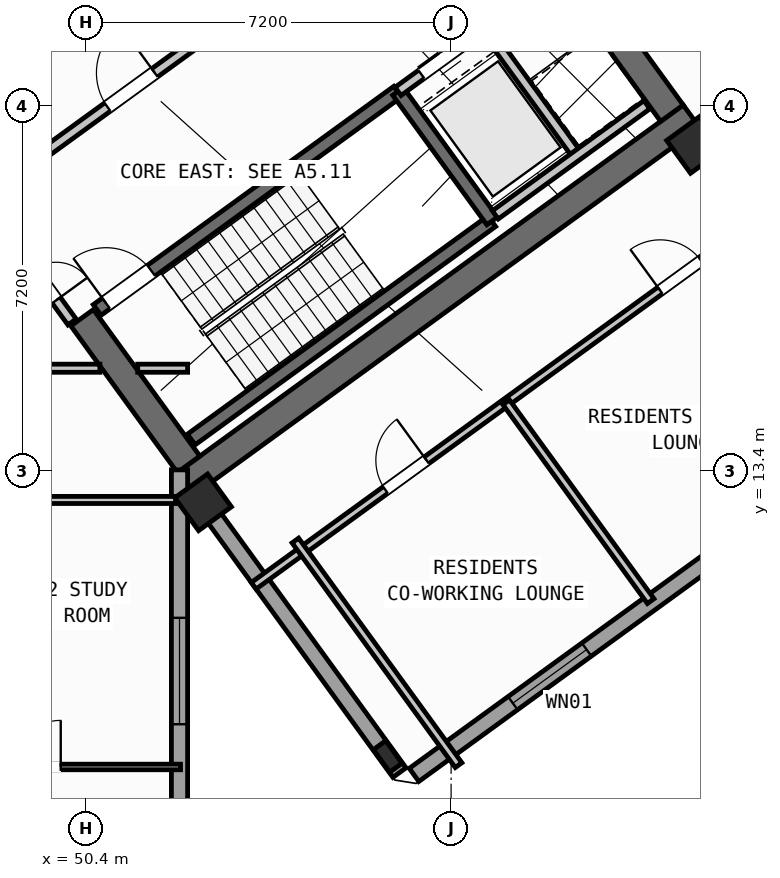
"""IFC4 building model, lengths in metres.
Left out: names, types, materials, properties, quantities, classifications, styles, units other than length and angle.
Written with IfcOpenShell. Run it as: python <this file> out.ifc"""

import sys

from ifc_helpers import new_model, si_unit, direction, frame, frame_2d, origin, origin_2d, place, context, subcontext, project, spatial, rectangle, hollow_rectangle, i_section, extrude, source, transform, mapped, element, fill, save


model = new_model("IFC4")
c1 = context("Model", 3, precision=1e-05, world=origin(), true_north=direction((0.0, 1.0)))
c2 = subcontext(c1, "Body", "Model", "MODEL_VIEW")
j1 = project(units=[si_unit("LENGTHUNIT", "METRE"), si_unit("PLANEANGLEUNIT", "RADIAN")], contexts=[c1])
p1 = place(None, origin())
s1 = spatial("IfcSite", under=j1, at=p1, CompositionType="ELEMENT")
p2 = place(p1, origin())
s2 = spatial("IfcBuilding", under=s1, at=p2, CompositionType="ELEMENT")
p3 = place(p2, frame((0.0, 0.0, 174.9)))
s3 = spatial("IfcBuildingStorey", under=s2, at=p3, CompositionType="ELEMENT", Elevation=174.9)
p4 = place(p3, frame((52.359, 13.14, 0.0), z_axis=(0.0, 0.0, 1.0), x_axis=(0.809014896919, 0.587788139183, 0.0)))
e1 = element("IfcWall", 1, at=p4, inside=s3, PredefinedType="SHEAR", context=c2, shape_type="SweptSolid", body=[
    extrude(rectangle(XDim=12.34, YDim=0.55, at=frame_2d((6.17, 0.0))), origin(), (0.0, 0.0, 1.0), 4.22),
])
for number, where, z_axis, x_axis in (
    (2, (52.42, 13.524, 0.0), (0.0, 0.0, 1.0), (-0.588, 0.809, 0.0)),
    (3, (61.958, 20.454, 0.0), (0.0, 0.0, 1.0), (-0.588, 0.809, 0.0)),
):
    element("IfcWall", number, at=place(p3, frame(where, z_axis=z_axis, x_axis=x_axis)), inside=s3, PredefinedType="SHEAR", context=c2, shape_type="SweptSolid", body=[
        extrude(rectangle(XDim=3.575, YDim=0.55, at=frame_2d((1.788, 0.0))), origin(), (0.0, 0.0, 1.0), 4.22),
    ])
m1 = source(origin(), c2, "Body", "SweptSolid", [
    extrude(i_section(OverallWidth=0.3, OverallDepth=0.55, WebThickness=0.015, FlangeThickness=0.029, at=origin_2d()), origin(), (0.0, 0.0, 1.0), 4.5),
])
p5 = place(p3, frame((56.35, 7.758, 0.0), z_axis=(0.0, 0.0, 1.0), x_axis=(0.809016994375, 0.587785252292, 0.0)))
e4 = element("IfcColumn", 4, at=p5, inside=s3, PredefinedType="COLUMN", context=c2, shape_type="MappedRepresentation", body=[
    mapped(m1, transform((0.0, 0.0, 0.0), scale=1.0)),
])
m2 = source(origin(), c2, "Body", "SweptSolid", [
    extrude(hollow_rectangle(XDim=0.8, YDim=0.8, WallThickness=0.032, at=origin_2d()), origin(), (0.0, 0.0, 1.0), 4.5),
])
for number, where, z_axis, x_axis in (
    (5, (52.705, 12.773, 0.0), (0.0, 0.0, 1.0), (0.809, 0.588, 0.0)),
    (6, (62.414, 19.827, 0.0), (0.0, 0.0, 1.0), (0.809, 0.588, 0.0)),
):
    element("IfcColumn", number, at=place(p3, frame(where, z_axis=z_axis, x_axis=x_axis)), inside=s3, PredefinedType="COLUMN", context=c2, shape_type="MappedRepresentation", body=[
        mapped(m2, transform((0.0, 0.0, 0.0), scale=1.0)),
    ])
p6 = place(p3, frame((58.455, 35.484, 0.0), z_axis=(0.0, 0.0, 1.0), x_axis=(0.587783625747, -0.809018176127, 0.0)))
e7 = element("IfcWall", 7, at=p6, inside=s3, PredefinedType="STANDARD", context=c2, shape_type="SweptSolid", body=[
    extrude(rectangle(XDim=21.587, YDim=0.32, at=frame_2d((10.794, 0.0))), origin(), (0.0, 0.0, 1.0), 2.395),
])
p7 = place(p6, frame((1.807, 0.0, 1.0)))
e8 = element("IfcOpeningElement", 8, at=p7, cuts=e7, PredefinedType="OPENING", context=c2, shape_type="SweptSolid", body=[
    extrude(rectangle(XDim=0.9, YDim=1.25, at=frame_2d((0.45, 0.625))), frame((0.0, 0.17, 0.0), z_axis=(0.0, -1.0, 0.0), x_axis=(1.0, 0.0, 0.0)), (0.0, 0.0, 1.0), 0.34),
])
p8 = place(p6, frame((5.195, 0.0, 1.0)))
e9 = element("IfcOpeningElement", 9, at=p8, cuts=e7, PredefinedType="OPENING", context=c2, shape_type="SweptSolid", body=[
    extrude(rectangle(XDim=0.9, YDim=1.25, at=frame_2d((0.45, 0.625))), frame((0.0, 0.17, 0.0), z_axis=(0.0, -1.0, 0.0), x_axis=(1.0, 0.0, 0.0)), (0.0, 0.0, 1.0), 0.34),
])
p9 = place(p6, frame((13.059, 0.0, 1.0)))
e10 = element("IfcOpeningElement", 10, at=p9, cuts=e7, PredefinedType="OPENING", context=c2, shape_type="SweptSolid", body=[
    extrude(rectangle(XDim=0.9, YDim=1.25, at=frame_2d((0.45, 0.625))), frame((0.0, 0.17, 0.0), z_axis=(0.0, -1.0, 0.0), x_axis=(1.0, 0.0, 0.0)), (0.0, 0.0, 1.0), 0.34),
])
p10 = place(p3, frame((71.098, 17.731, 0.0), z_axis=(0.0, 0.0, 1.0), x_axis=(-0.809021120468, -0.587779573171, 0.0)))
e11 = element("IfcWall", 11, at=p10, inside=s3, PredefinedType="STANDARD", context=c2, shape_type="SweptSolid", body=[
    extrude(rectangle(XDim=17.588, YDim=0.32, at=frame_2d((8.794, 0.0))), origin(), (0.0, 0.0, 1.0), 4.22),
])
p11 = place(p10, frame((1.875, 0.0, 0.0)))
e12 = element("IfcOpeningElement", 12, at=p11, cuts=e11, PredefinedType="OPENING", context=c2, shape_type="SweptSolid", body=[
    extrude(rectangle(XDim=1.05, YDim=2.15, at=frame_2d((0.525, 1.075))), frame((0.0, 0.17, 0.0), z_axis=(0.0, -1.0, 0.0), x_axis=(1.0, 0.0, 0.0)), (0.0, 0.0, 1.0), 0.34),
])
p12 = place(p10, frame((7.801, 0.0, 0.8)))
e13 = element("IfcOpeningElement", 13, at=p12, cuts=e11, PredefinedType="OPENING", context=c2, shape_type="SweptSolid", body=[
    extrude(rectangle(XDim=2.1, YDim=1.55, at=frame_2d((1.05, 0.775))), frame((0.0, 0.17, 0.0), z_axis=(0.0, -1.0, 0.0), x_axis=(1.0, 0.0, 0.0)), (0.0, 0.0, 1.0), 0.34),
])
p13 = place(p10, frame((13.379, 0.0, 0.85)))
e14 = element("IfcOpeningElement", 14, at=p13, cuts=e11, PredefinedType="OPENING", context=c2, shape_type="SweptSolid", body=[
    extrude(rectangle(XDim=1.8, YDim=1.5, at=frame_2d((0.9, 0.75))), frame((0.0, 0.17, 0.0), z_axis=(0.0, -1.0, 0.0), x_axis=(1.0, 0.0, 0.0)), (0.0, 0.0, 1.0), 0.34),
])
p14 = place(p3, frame((56.581, 7.439, 0.0), z_axis=(0.0, 0.0, 1.0), x_axis=(-0.587771678454, 0.809026856172, 0.0)))
e15 = element("IfcWall", 15, at=p14, inside=s3, PredefinedType="STANDARD", context=c2, shape_type="SweptSolid", body=[
    extrude(rectangle(XDim=6.824, YDim=0.32, at=frame_2d((3.412, 0.0))), origin(), (0.0, 0.0, 1.0), 4.22),
])
p15 = place(p3, frame((52.24, 13.414, 0.0), z_axis=(0.0, 0.0, 1.0), x_axis=(0.0, -1.0, 0.0)))
e16 = element("IfcWall", 16, at=p15, inside=s3, PredefinedType="STANDARD", context=c2, shape_type="SweptSolid", body=[
    extrude(rectangle(XDim=9.948, YDim=0.32, at=frame_2d((4.974, 0.0))), origin(), (0.0, 0.0, 1.0), 4.22),
])
p16 = place(p15, frame((2.92, 0.0, 0.8)))
e17 = element("IfcOpeningElement", 17, at=p16, cuts=e16, PredefinedType="OPENING", context=c2, shape_type="SweptSolid", body=[
    extrude(rectangle(XDim=2.1, YDim=1.55, at=frame_2d((1.05, 0.775))), frame((0.0, 0.17, 0.0), z_axis=(0.0, -1.0, 0.0), x_axis=(1.0, 0.0, 0.0)), (0.0, 0.0, 1.0), 0.34),
])
p17 = place(p15, frame((7.033, 0.0, 0.85)))
e18 = element("IfcOpeningElement", 18, at=p17, cuts=e16, PredefinedType="OPENING", context=c2, shape_type="SweptSolid", body=[
    extrude(rectangle(XDim=1.8, YDim=1.5, at=frame_2d((0.9, 0.75))), frame((0.0, 0.17, 0.0), z_axis=(0.0, -1.0, 0.0), x_axis=(1.0, 0.0, 0.0)), (0.0, 0.0, 1.0), 0.34),
])
p18 = place(p3, frame((52.472, 14.013, 0.0), z_axis=(0.0, 0.0, 1.0), x_axis=(0.809028366311, 0.587769599847, 0.0)))
e19 = element("IfcWall", 19, at=p18, inside=s3, PredefinedType="SHEAR", context=c2, shape_type="SweptSolid", body=[
    extrude(rectangle(XDim=7.33, YDim=0.26, at=frame_2d((3.665, 0.0))), origin(), (0.0, 0.0, 1.0), 4.22),
])
p19 = place(p3, frame((50.615, 16.57, 0.0), z_axis=(0.0, 0.0, 1.0), x_axis=(0.809028366311, 0.587769599847, 0.0)))
e20 = element("IfcWall", 20, at=p19, inside=s3, PredefinedType="SHEAR", context=c2, shape_type="SweptSolid", body=[
    extrude(rectangle(XDim=7.33, YDim=0.26, at=frame_2d((3.665, 0.0))), origin(), (0.0, 0.0, 1.0), 4.22),
])
p20 = place(p19, frame((0.22, 0.0, 0.0)))
e21 = element("IfcOpeningElement", 21, at=p20, cuts=e20, PredefinedType="OPENING", context=c2, shape_type="SweptSolid", body=[
    extrude(rectangle(XDim=1.1, YDim=2.1, at=frame_2d((0.55, 1.05))), frame((0.0, 0.14, 0.0), z_axis=(0.0, -1.0, 0.0), x_axis=(1.0, 0.0, 0.0)), (0.0, 0.0, 1.0), 0.28),
])
p21 = place(p3, frame((58.41, 18.327, 0.0), z_axis=(0.0, 0.0, 1.0), x_axis=(-0.58776738483, 0.809029975545, 0.0)))
e22 = element("IfcWall", 22, at=p21, inside=s3, PredefinedType="SHEAR", context=c2, shape_type="SweptSolid", body=[
    extrude(rectangle(XDim=3.16, YDim=0.26, at=frame_2d((1.58, 0.0))), origin(), (0.0, 0.0, 1.0), 4.22),
])
p22 = place(p3, frame((47.065, 21.407, 0.0), z_axis=(0.0, 0.0, 1.0), x_axis=(0.809032984992, 0.587763242466, 0.0)))
e23 = element("IfcWall", 23, at=p22, inside=s3, PredefinedType="STANDARD", context=c2, shape_type="SweptSolid", body=[
    extrude(rectangle(XDim=3.448, YDim=0.2, at=frame_2d((1.724, 0.0))), origin(), (0.0, 0.0, 1.0), 4.21),
])
p23 = place(p22, frame((0.458, 0.0, 0.0)))
e24 = element("IfcOpeningElement", 24, at=p23, cuts=e23, PredefinedType="OPENING", context=c2, shape_type="SweptSolid", body=[
    extrude(rectangle(XDim=1.3, YDim=2.2, at=frame_2d((0.65, 1.1))), frame((0.0, 0.11, 0.0), z_axis=(0.0, -1.0, 0.0), x_axis=(1.0, 0.0, 0.0)), (0.0, 0.0, 1.0), 0.22),
])
p24 = place(p3, frame((48.758, 19.077, 0.0), z_axis=(0.0, 0.0, 1.0), x_axis=(0.809005065155, 0.587801671104, 0.0)))
e25 = element("IfcWall", 25, at=p24, inside=s3, PredefinedType="STANDARD", context=c2, shape_type="SweptSolid", body=[
    extrude(rectangle(XDim=5.768, YDim=0.2, at=frame_2d((2.884, 0.0))), origin(), (0.0, 0.0, 1.0), 4.21),
])
p25 = place(p24, frame((2.548, 0.0, 0.0)))
e26 = element("IfcOpeningElement", 26, at=p25, cuts=e25, PredefinedType="OPENING", context=c2, shape_type="SweptSolid", body=[
    extrude(rectangle(XDim=1.15, YDim=2.1, at=frame_2d((0.575, 1.05))), frame((0.0, 0.11, 0.0), z_axis=(0.0, -1.0, 0.0), x_axis=(1.0, 0.0, 0.0)), (0.0, 0.0, 1.0), 0.22),
])
p26 = place(p3, frame((56.553, 20.884, 0.0), z_axis=(0.0, 0.0, 1.0), x_axis=(0.809023564264, 0.58777620951, 0.0)))
e27 = element("IfcWall", 27, at=p26, inside=s3, PredefinedType="STANDARD", context=c2, shape_type="SweptSolid", body=[
    extrude(rectangle(XDim=3.818, YDim=0.2, at=frame_2d((1.909, 0.0))), origin(), (0.0, 0.0, 1.0), 4.21),
])
p27 = place(p26, frame((0.57, 0.0, 0.0)))
e28 = element("IfcOpeningElement", 28, at=p27, cuts=e27, PredefinedType="OPENING", context=c2, shape_type="SweptSolid", body=[
    extrude(rectangle(XDim=1.1, YDim=2.15, at=frame_2d((0.55, 1.075))), frame((0.0, 0.11, 0.0), z_axis=(0.0, -1.0, 0.0), x_axis=(1.0, 0.0, 0.0)), (0.0, 0.0, 1.0), 0.22),
])
p28 = place(p26, frame((2.65, 0.0, 0.0)))
e29 = element("IfcOpeningElement", 29, at=p28, cuts=e27, PredefinedType="OPENING", context=c2, shape_type="SweptSolid", body=[
    extrude(rectangle(XDim=0.86, YDim=2.05, at=frame_2d((0.43, 1.025))), frame((0.0, 0.11, 0.0), z_axis=(0.0, -1.0, 0.0), x_axis=(1.0, 0.0, 0.0)), (0.0, 0.0, 1.0), 0.22),
])
p29 = place(p3, frame((60.067, 19.655, 0.0), z_axis=(0.0, 0.0, 1.0), x_axis=(-0.587800520745, 0.809005900975, 0.0)))
e30 = element("IfcWall", 30, at=p29, inside=s3, PredefinedType="STANDARD", context=c2, shape_type="SweptSolid", body=[
    extrude(rectangle(XDim=2.66, YDim=0.2, at=frame_2d((1.33, 0.0))), origin(), (0.0, 0.0, 1.0), 4.21),
])
p30 = place(p3, frame((58.472, 18.447, 0.0), z_axis=(0.0, 0.0, 1.0), x_axis=(0.809018631237, 0.587782999339, 0.0)))
e31 = element("IfcWall", 31, at=p30, inside=s3, PredefinedType="STANDARD", context=c2, shape_type="SweptSolid", body=[
    extrude(rectangle(XDim=3.698, YDim=0.2, at=frame_2d((1.849, 0.0))), origin(), (0.0, 0.0, 1.0), 4.21),
])
p31 = place(p3, frame((35.237, 15.42, 0.0), z_axis=(0.0, 0.0, 1.0), x_axis=(1.0, 0.0, 0.0)))
e32 = element("IfcWall", 32, at=p31, inside=s3, PredefinedType="PARTITIONING", context=c2, shape_type="SweptSolid", body=[
    extrude(rectangle(XDim=15.432, YDim=0.16, at=frame_2d((7.716, 0.0))), origin(), (0.0, 0.0, 1.0), 4.21),
])
p32 = place(p31, frame((0.969, 0.0, 0.0)))
e33 = element("IfcOpeningElement", 33, at=p32, cuts=e32, PredefinedType="OPENING", context=c2, shape_type="SweptSolid", body=[
    extrude(rectangle(XDim=1.0, YDim=2.1, at=frame_2d((0.5, 1.05))), frame((0.0, 0.09, 0.0), z_axis=(0.0, -1.0, 0.0), x_axis=(1.0, 0.0, 0.0)), (0.0, 0.0, 1.0), 0.18),
])
p33 = place(p31, frame((8.799, 0.0, 0.0)))
e34 = element("IfcOpeningElement", 34, at=p33, cuts=e32, PredefinedType="OPENING", context=c2, shape_type="SweptSolid", body=[
    extrude(rectangle(XDim=1.0, YDim=2.1, at=frame_2d((0.5, 1.05))), frame((0.0, 0.09, 0.0), z_axis=(0.0, -1.0, 0.0), x_axis=(1.0, 0.0, 0.0)), (0.0, 0.0, 1.0), 0.18),
])
p34 = place(p3, frame((51.416, 15.42, 0.0), z_axis=(0.0, 0.0, 1.0), x_axis=(1.0, 0.0, 0.0)))
e35 = element("IfcWall", 35, at=p34, inside=s3, PredefinedType="PARTITIONING", context=c2, shape_type="SweptSolid", body=[
    extrude(rectangle(XDim=0.984, YDim=0.16, at=frame_2d((0.492, 0.0))), origin(), (0.0, 0.0, 1.0), 4.21),
])
p35 = place(p3, frame((50.119, 16.333, 0.0), z_axis=(0.0, 0.0, 1.0), x_axis=(-0.587749856981, 0.809042709391, 0.0)))
e36 = element("IfcWall", 36, at=p35, inside=s3, PredefinedType="STANDARD", context=c2, shape_type="SweptSolid", body=[
    extrude(rectangle(XDim=2.96, YDim=0.2, at=frame_2d((1.48, 0.0))), origin(), (0.0, 0.0, 1.0), 2.395),
])
p36 = place(p35, frame((0.53, 0.0, 0.0)))
e37 = element("IfcOpeningElement", 37, at=p36, cuts=e36, PredefinedType="OPENING", context=c2, shape_type="SweptSolid", body=[
    extrude(rectangle(XDim=1.5, YDim=2.15, at=frame_2d((0.75, 1.075))), frame((0.0, 0.11, 0.0), z_axis=(0.0, -1.0, 0.0), x_axis=(1.0, 0.0, 0.0)), (0.0, 0.0, 1.0), 0.22),
])
p37 = place(p3, frame((47.072, 12.82, 0.0), z_axis=(0.0, 0.0, 1.0), x_axis=(1.0, 0.0, 0.0)))
e38 = element("IfcWall", 38, at=p37, inside=s3, PredefinedType="PLUMBINGWALL", context=c2, shape_type="SweptSolid", body=[
    extrude(rectangle(XDim=5.09, YDim=0.14, at=frame_2d((2.545, 0.0))), origin(), (0.0, 0.0, 1.0), 3.395),
])
p38 = place(p3, frame((47.072, 7.55, 0.0), z_axis=(0.0, 0.0, 1.0), x_axis=(1.0, 0.0, 0.0)))
e39 = element("IfcWall", 39, at=p38, inside=s3, PredefinedType="PARTITIONING", context=c2, shape_type="SweptSolid", body=[
    extrude(rectangle(XDim=5.188, YDim=0.11, at=frame_2d((2.594, 0.0))), origin(), (0.0, 0.0, 1.0), 4.21),
])
p39 = place(p38, frame((1.904, 0.0, 0.0)))
e40 = element("IfcOpeningElement", 40, at=p39, cuts=e39, PredefinedType="OPENING", context=c2, shape_type="SweptSolid", body=[
    extrude(rectangle(XDim=0.92, YDim=2.08, at=frame_2d((0.46, 1.04))), frame((0.0, 0.065, 0.0), z_axis=(0.0, -1.0, 0.0), x_axis=(1.0, 0.0, 0.0)), (0.0, 0.0, 1.0), 0.13),
])
p40 = place(p3, frame((53.705, 11.126, 0.0), z_axis=(0.0, 0.0, 1.0), x_axis=(0.809014504436, 0.587788679384, 0.0)))
e41 = element("IfcWall", 41, at=p40, inside=s3, PredefinedType="PARTITIONING", context=c2, shape_type="SweptSolid", body=[
    extrude(rectangle(XDim=14.67, YDim=0.16, at=frame_2d((7.335, 0.0))), origin(), (0.0, 0.0, 1.0), 4.21),
])
p41 = place(p40, frame((3.215, 0.0, 0.0)))
e42 = element("IfcOpeningElement", 42, at=p41, cuts=e41, PredefinedType="OPENING", context=c2, shape_type="SweptSolid", body=[
    extrude(rectangle(XDim=1.0, YDim=2.1, at=frame_2d((0.5, 1.05))), frame((0.0, 0.09, 0.0), z_axis=(0.0, -1.0, 0.0), x_axis=(1.0, 0.0, 0.0)), (0.0, 0.0, 1.0), 0.18),
])
p42 = place(p40, frame((9.915, 0.0, 0.0)))
e43 = element("IfcOpeningElement", 43, at=p42, cuts=e41, PredefinedType="OPENING", context=c2, shape_type="SweptSolid", body=[
    extrude(rectangle(XDim=1.0, YDim=2.1, at=frame_2d((0.5, 1.05))), frame((0.0, 0.09, 0.0), z_axis=(0.0, -1.0, 0.0), x_axis=(1.0, 0.0, 0.0)), (0.0, 0.0, 1.0), 0.18),
])
p43 = place(p3, frame((57.747, 7.586, 0.0), z_axis=(0.0, 0.0, 1.0), x_axis=(-0.587784893399, 0.809017255126, 0.0)))
e44 = element("IfcWall", 44, at=p43, inside=s3, PredefinedType="PARTITIONING", context=c2, shape_type="SweptSolid", body=[
    extrude(rectangle(XDim=5.48, YDim=0.16, at=frame_2d((2.74, 0.0))), origin(), (0.0, 0.0, 1.0), 4.21),
])
p44 = place(p3, frame((61.539, 10.823, 0.0), z_axis=(0.0, 0.0, 1.0), x_axis=(-0.587785532001, 0.809016791155, 0.0)))
e45 = element("IfcWall", 45, at=p44, inside=s3, PredefinedType="PARTITIONING", context=c2, shape_type="SweptSolid", body=[
    extrude(rectangle(XDim=4.85, YDim=0.16, at=frame_2d((2.425, 0.0))), origin(), (0.0, 0.0, 1.0), 4.21),
])
m3 = source(origin(), c2, "Body", "SweptSolid", [
    extrude(rectangle(XDim=1.8, YDim=1.5, at=frame_2d((0.9, 0.75))), frame((0.0, 0.03, 0.0), z_axis=(0.0, -1.0, 0.0), x_axis=(1.0, 0.0, 0.0)), (0.0, 0.0, 1.0), 0.06),
])
p45 = place(p13, origin())
e46 = element("IfcWindow", 46, at=p45, inside=s3, PartitioningType="SINGLE_PANEL", PredefinedType="WINDOW", context=c2, shape_type="MappedRepresentation", body=[
    mapped(m3, transform((0.0, 0.0, 0.0), scale=1.0)),
])
fill(e14, e46)
m4 = source(origin(), c2, "Body", "SweptSolid", [
    extrude(rectangle(XDim=2.1, YDim=1.55, at=frame_2d((1.05, 0.775))), frame((0.0, 0.03, 0.0), z_axis=(0.0, -1.0, 0.0), x_axis=(1.0, 0.0, 0.0)), (0.0, 0.0, 1.0), 0.06),
])
p46 = place(p16, origin())
e47 = element("IfcWindow", 47, at=p46, inside=s3, PartitioningType="SINGLE_PANEL", PredefinedType="WINDOW", context=c2, shape_type="MappedRepresentation", body=[
    mapped(m4, transform((0.0, 0.0, 0.0), scale=1.0)),
])
fill(e17, e47)
m5 = source(origin(), c2, "Body", "SweptSolid", [
    extrude(rectangle(XDim=1.1, YDim=2.1, at=frame_2d((0.55, 1.05))), frame((0.0, 0.025, 0.0), z_axis=(0.0, -1.0, 0.0), x_axis=(1.0, 0.0, 0.0)), (0.0, 0.0, 1.0), 0.05),
])
p47 = place(p20, origin())
e48 = element("IfcDoor", 48, at=p47, inside=s3, OperationType="SINGLE_SWING_LEFT", PredefinedType="DOOR", context=c2, shape_type="MappedRepresentation", body=[
    mapped(m5, transform((0.0, 0.0, 0.0), scale=1.0)),
])
fill(e21, e48)
m6 = source(origin(), c2, "Body", "SweptSolid", [
    extrude(rectangle(XDim=1.15, YDim=2.1, at=frame_2d((0.575, 1.05))), frame((0.0, 0.025, 0.0), z_axis=(0.0, -1.0, 0.0), x_axis=(1.0, 0.0, 0.0)), (0.0, 0.0, 1.0), 0.05),
])
p48 = place(p25, origin())
e49 = element("IfcDoor", 49, at=p48, inside=s3, OperationType="SINGLE_SWING_RIGHT", PredefinedType="DOOR", context=c2, shape_type="MappedRepresentation", body=[
    mapped(m6, transform((0.0, 0.0, 0.0), scale=1.0)),
])
fill(e26, e49)
m7 = source(origin(), c2, "Body", "SweptSolid", [
    extrude(rectangle(XDim=1.1, YDim=2.15, at=frame_2d((0.55, 1.075))), frame((0.0, 0.025, 0.0), z_axis=(0.0, -1.0, 0.0), x_axis=(1.0, 0.0, 0.0)), (0.0, 0.0, 1.0), 0.05),
])
p49 = place(p27, origin())
e50 = element("IfcDoor", 50, at=p49, inside=s3, OperationType="DOUBLE_DOOR_SLIDING", PredefinedType="DOOR", context=c2, shape_type="MappedRepresentation", body=[
    mapped(m7, transform((0.0, 0.0, 0.0), scale=1.0)),
])
fill(e28, e50)
m8 = source(origin(), c2, "Body", "SweptSolid", [
    extrude(rectangle(XDim=1.5, YDim=2.15, at=frame_2d((0.75, 1.075))), frame((0.0, 0.025, 0.0), z_axis=(0.0, -1.0, 0.0), x_axis=(1.0, 0.0, 0.0)), (0.0, 0.0, 1.0), 0.05),
])
p50 = place(p36, frame((1.5, 0.0, 0.0), z_axis=(0.0, 0.0, 1.0), x_axis=(-1.0, 0.0, 0.0)))
e51 = element("IfcDoor", 51, at=p50, inside=s3, OperationType="DOUBLE_DOOR_SINGLE_SWING", PredefinedType="DOOR", context=c2, shape_type="MappedRepresentation", body=[
    mapped(m8, transform((0.0, 0.0, 0.0), scale=1.0)),
])
fill(e37, e51)
m9 = source(origin(), c2, "Body", "SweptSolid", [
    extrude(rectangle(XDim=0.92, YDim=2.08, at=frame_2d((0.46, 1.04))), frame((0.0, 0.025, 0.0), z_axis=(0.0, -1.0, 0.0), x_axis=(1.0, 0.0, 0.0)), (0.0, 0.0, 1.0), 0.05),
])
p51 = place(p39, origin())
e52 = element("IfcDoor", 52, at=p51, inside=s3, OperationType="SINGLE_SWING_RIGHT", PredefinedType="DOOR", context=c2, shape_type="MappedRepresentation", body=[
    mapped(m9, transform((0.0, 0.0, 0.0), scale=1.0)),
])
fill(e40, e52)
m10 = source(origin(), c2, "Body", "SweptSolid", [
    extrude(rectangle(XDim=1.0, YDim=2.1, at=frame_2d((0.5, 1.05))), frame((0.0, 0.025, 0.0), z_axis=(0.0, -1.0, 0.0), x_axis=(1.0, 0.0, 0.0)), (0.0, 0.0, 1.0), 0.05),
])
p52 = place(p41, origin())
e53 = element("IfcDoor", 53, at=p52, inside=s3, OperationType="SINGLE_SWING_RIGHT", PredefinedType="DOOR", context=c2, shape_type="MappedRepresentation", body=[
    mapped(m10, transform((0.0, 0.0, 0.0), scale=1.0)),
])
fill(e42, e53)
p53 = place(p42, origin())
e54 = element("IfcDoor", 54, at=p53, inside=s3, OperationType="SINGLE_SWING_LEFT", PredefinedType="DOOR", context=c2, shape_type="MappedRepresentation", body=[
    mapped(m10, transform((0.0, 0.0, 0.0), scale=1.0)),
])
fill(e43, e54)
save(model, sys.argv[1])
